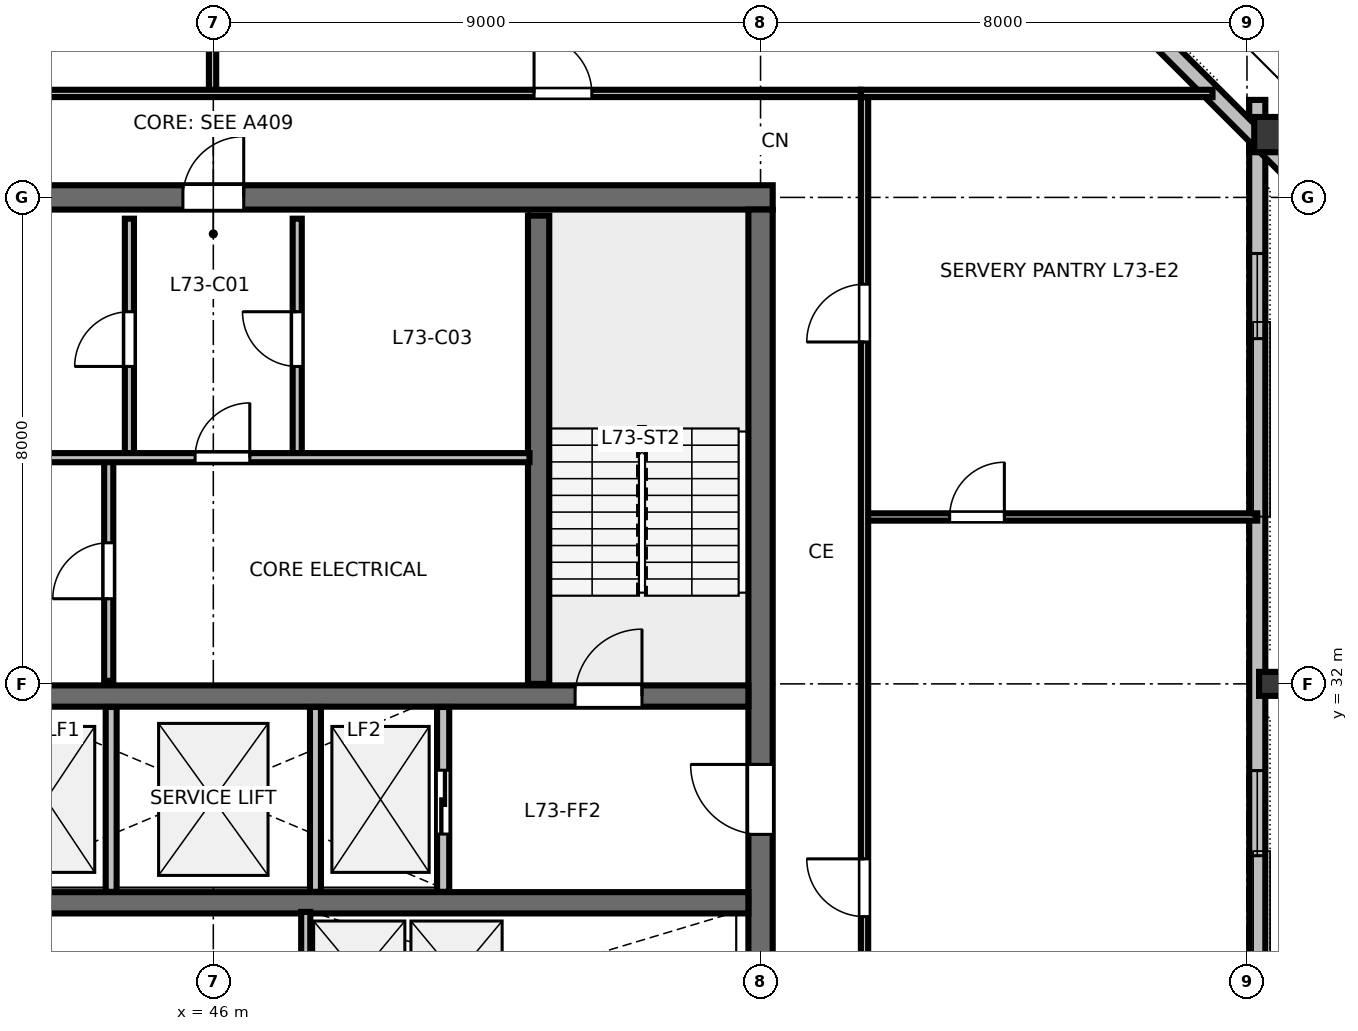
"""IFC4 building model, lengths in metres.
Left out: names, types, materials, properties, quantities, classifications, styles, units other than length and angle.
Written with IfcOpenShell. Run it as: python <this file> out.ifc"""

import sys

from ifc_helpers import new_model, si_unit, direction, frame, frame_2d, origin, origin_2d, place, context, subcontext, project, spatial, rectangle, hollow_rectangle, i_section, extrude, element, fill, save


model = new_model("IFC4")
c1 = context("Model", 3, precision=1e-05, world=origin(), true_north=direction((0.0, 1.0)))
c2 = subcontext(c1, "Body", "Model", "MODEL_VIEW")
j1 = project(units=[si_unit("LENGTHUNIT", "METRE"), si_unit("PLANEANGLEUNIT", "RADIAN")], contexts=[c1])
p1 = place(None, origin())
s1 = spatial("IfcSite", under=j1, at=p1, CompositionType="ELEMENT")
p2 = place(p1, origin())
s2 = spatial("IfcBuilding", under=s1, at=p2, CompositionType="ELEMENT")
p3 = place(p2, frame((0.0, 0.0, 275.4)))
s3 = spatial("IfcBuildingStorey", under=s2, at=p3, CompositionType="ELEMENT", Elevation=275.4)
p4 = place(p3, frame((36.8, 40.0, 0.0), z_axis=(0.0, 0.0, 1.0), x_axis=(1.0, 0.0, 0.0)))
e1 = element("IfcWall", 1, at=p4, inside=s3, PredefinedType="SHEAR", context=c2, shape_type="SweptSolid", body=[
    extrude(rectangle(XDim=18.4, YDim=0.4, at=frame_2d((9.2, 0.0))), origin(), (0.0, 0.0, 1.0), 3.28),
])
p5 = place(p4, frame((8.7, 0.0, 0.0)))
e2 = element("IfcOpeningElement", 2, at=p5, cuts=e1, PredefinedType="OPENING", context=c2, shape_type="SweptSolid", body=[
    extrude(rectangle(XDim=1.0, YDim=2.15, at=frame_2d((0.5, 1.075))), frame((0.0, 0.21, 0.0), z_axis=(0.0, -1.0, 0.0), x_axis=(1.0, 0.0, 0.0)), (0.0, 0.0, 1.0), 0.42),
])
p6 = place(p3, frame((55.0, 24.2, 0.0), z_axis=(0.0, 0.0, 1.0), x_axis=(0.0, 1.0, 0.0)))
e3 = element("IfcWall", 3, at=p6, inside=s3, PredefinedType="SHEAR", context=c2, shape_type="SweptSolid", body=[
    extrude(rectangle(XDim=15.6, YDim=0.4, at=frame_2d((7.8, 0.0))), origin(), (0.0, 0.0, 1.0), 3.28),
])
p7 = place(p6, frame((5.325, 0.0, 0.0)))
e4 = element("IfcOpeningElement", 4, at=p7, cuts=e3, PredefinedType="OPENING", context=c2, shape_type="SweptSolid", body=[
    extrude(rectangle(XDim=1.15, YDim=2.15, at=frame_2d((0.575, 1.075))), frame((0.0, 0.21, 0.0), z_axis=(0.0, -1.0, 0.0), x_axis=(1.0, 0.0, 0.0)), (0.0, 0.0, 1.0), 0.42),
])
p8 = place(p3, frame((37.2, 31.8, 0.0), z_axis=(0.0, 0.0, 1.0), x_axis=(1.0, 0.0, 0.0)))
e5 = element("IfcWall", 5, at=p8, inside=s3, PredefinedType="SHEAR", context=c2, shape_type="SweptSolid", body=[
    extrude(rectangle(XDim=17.6, YDim=0.35, at=frame_2d((8.8, 0.0))), origin(), (0.0, 0.0, 1.0), 3.28),
])
p9 = place(p8, frame((0.85, 0.0, 0.0)))
e6 = element("IfcOpeningElement", 6, at=p9, cuts=e5, PredefinedType="OPENING", context=c2, shape_type="SweptSolid", body=[
    extrude(rectangle(XDim=1.1, YDim=2.15, at=frame_2d((0.55, 1.075))), frame((0.0, 0.185, 0.0), z_axis=(0.0, -1.0, 0.0), x_axis=(1.0, 0.0, 0.0)), (0.0, 0.0, 1.0), 0.37),
])
p10 = place(p8, frame((14.75, 0.0, 0.0)))
e7 = element("IfcOpeningElement", 7, at=p10, cuts=e5, PredefinedType="OPENING", context=c2, shape_type="SweptSolid", body=[
    extrude(rectangle(XDim=1.1, YDim=2.15, at=frame_2d((0.55, 1.075))), frame((0.0, 0.185, 0.0), z_axis=(0.0, -1.0, 0.0), x_axis=(1.0, 0.0, 0.0)), (0.0, 0.0, 1.0), 0.37),
])
p11 = place(p3, frame((37.2, 28.4, 0.0), z_axis=(0.0, 0.0, 1.0), x_axis=(1.0, 0.0, 0.0)))
e8 = element("IfcWall", 8, at=p11, inside=s3, PredefinedType="SHEAR", context=c2, shape_type="SweptSolid", body=[
    extrude(rectangle(XDim=17.6, YDim=0.35, at=frame_2d((8.8, 0.0))), origin(), (0.0, 0.0, 1.0), 3.28),
])
p12 = place(p3, frame((63.389, 32.0, 0.0), z_axis=(-0.124611214962, 0.0, 0.99220564658), x_axis=(0.99220564658, 0.0, 0.124611214962)))
e9 = element("IfcColumn", 9, at=p12, inside=s3, PredefinedType="COLUMN", context=c2, shape_type="SweptSolid", body=[
    extrude(i_section(OverallWidth=0.395, OverallDepth=0.38, WebThickness=0.019, FlangeThickness=0.03, FilletRadius=0.025, at=origin_2d()), origin(), (0.0, 0.0, 1.0), 3.284),
])
p13 = place(p3, frame((63.469, 41.033, 0.0), z_axis=(-0.124526454344, -0.108785128068, 0.986234737818), x_axis=(0.742735851575, 0.648846987251, 0.165351268276)))
e10 = element("IfcColumn", 10, at=p13, inside=s3, PredefinedType="COLUMN", context=c2, shape_type="SweptSolid", body=[
    extrude(hollow_rectangle(XDim=0.58, YDim=0.7, WallThickness=0.032, at=origin_2d()), origin(), (0.0, 0.0, 1.0), 3.303),
])
p14 = place(p3, frame((63.169, 22.396, 0.0), z_axis=(0.0, 0.0, 1.0), x_axis=(0.0, 1.0, 0.0)))
e11 = element("IfcWall", 11, at=p14, inside=s3, PredefinedType="STANDARD", context=c2, shape_type="SweptSolid", body=[
    extrude(rectangle(XDim=19.207, YDim=0.265, at=frame_2d((9.604, 0.0))), origin(), (0.0, 0.0, 1.0), 2.717),
])
p15 = place(p14, frame((2.526, 0.0, 0.85)))
e12 = element("IfcOpeningElement", 12, at=p15, cuts=e11, PredefinedType="OPENING", context=c2, shape_type="SweptSolid", body=[
    extrude(rectangle(XDim=1.4, YDim=1.2, at=frame_2d((0.7, 0.6))), frame((0.0, 0.142, 0.0), z_axis=(0.0, -1.0, 0.0), x_axis=(1.0, 0.0, 0.0)), (0.0, 0.0, 1.0), 0.285),
])
p16 = place(p14, frame((6.778, 0.0, 0.85)))
e13 = element("IfcOpeningElement", 13, at=p16, cuts=e11, PredefinedType="OPENING", context=c2, shape_type="SweptSolid", body=[
    extrude(rectangle(XDim=1.4, YDim=1.2, at=frame_2d((0.7, 0.6))), frame((0.0, 0.142, 0.0), z_axis=(0.0, -1.0, 0.0), x_axis=(1.0, 0.0, 0.0)), (0.0, 0.0, 1.0), 0.285),
])
p17 = place(p14, frame((15.281, 0.0, 0.85)))
e14 = element("IfcOpeningElement", 14, at=p17, cuts=e11, PredefinedType="OPENING", context=c2, shape_type="SweptSolid", body=[
    extrude(rectangle(XDim=1.4, YDim=1.2, at=frame_2d((0.7, 0.6))), frame((0.0, 0.142, 0.0), z_axis=(0.0, -1.0, 0.0), x_axis=(1.0, 0.0, 0.0)), (0.0, 0.0, 1.0), 0.285),
])
p18 = place(p3, frame((63.614, 40.529, 0.0), z_axis=(0.0, 0.0, 1.0), x_axis=(-0.707106781187, 0.707106781187, 0.0)))
e15 = element("IfcWall", 15, at=p18, inside=s3, PredefinedType="STANDARD", context=c2, shape_type="SweptSolid", body=[
    extrude(rectangle(XDim=11.125, YDim=0.265, at=frame_2d((5.562, 0.0))), origin(), (0.0, 0.0, 1.0), 2.717),
])
p19 = place(p3, frame((51.35, 32.0, 0.0), z_axis=(0.0, 0.0, 1.0), x_axis=(0.0, 1.0, 0.0)))
e16 = element("IfcWall", 16, at=p19, inside=s3, PredefinedType="SHEAR", context=c2, shape_type="SweptSolid", body=[
    extrude(rectangle(XDim=7.7, YDim=0.35, at=frame_2d((3.85, 0.0))), origin(), (0.0, 0.0, 1.0), 3.6),
])
p20 = place(p3, frame((44.62, 35.72, 0.0), z_axis=(0.0, 0.0, 1.0), x_axis=(0.0, 1.0, 0.0)))
e17 = element("IfcWall", 17, at=p20, inside=s3, PredefinedType="PARTITIONING", context=c2, shape_type="SweptSolid", body=[
    extrude(rectangle(XDim=3.93, YDim=0.15, at=frame_2d((1.965, 0.0))), origin(), (0.0, 0.0, 1.0), 3.26),
])
p21 = place(p20, frame((1.5, 0.0, 0.0)))
e18 = element("IfcOpeningElement", 18, at=p21, cuts=e17, PredefinedType="OPENING", context=c2, shape_type="SweptSolid", body=[
    extrude(rectangle(XDim=0.9, YDim=2.15, at=frame_2d((0.45, 1.075))), frame((0.0, 0.085, 0.0), z_axis=(0.0, -1.0, 0.0), x_axis=(1.0, 0.0, 0.0)), (0.0, 0.0, 1.0), 0.17),
])
p22 = place(p3, frame((47.38, 35.72, 0.0), z_axis=(0.0, 0.0, 1.0), x_axis=(0.0, 1.0, 0.0)))
e19 = element("IfcWall", 19, at=p22, inside=s3, PredefinedType="PARTITIONING", context=c2, shape_type="SweptSolid", body=[
    extrude(rectangle(XDim=3.93, YDim=0.15, at=frame_2d((1.965, 0.0))), origin(), (0.0, 0.0, 1.0), 3.26),
])
p23 = place(p22, frame((1.5, 0.0, 0.0)))
e20 = element("IfcOpeningElement", 20, at=p23, cuts=e19, PredefinedType="OPENING", context=c2, shape_type="SweptSolid", body=[
    extrude(rectangle(XDim=0.9, YDim=2.15, at=frame_2d((0.45, 1.075))), frame((0.0, 0.085, 0.0), z_axis=(0.0, -1.0, 0.0), x_axis=(1.0, 0.0, 0.0)), (0.0, 0.0, 1.0), 0.17),
])
p24 = place(p3, frame((44.28, 32.05, 0.0), z_axis=(0.0, 0.0, 1.0), x_axis=(0.0, 1.0, 0.0)))
e21 = element("IfcWall", 21, at=p24, inside=s3, PredefinedType="PARTITIONING", context=c2, shape_type="SweptSolid", body=[
    extrude(rectangle(XDim=3.67, YDim=0.15, at=frame_2d((1.835, 0.0))), origin(), (0.0, 0.0, 1.0), 3.26),
])
p25 = place(p24, frame((1.35, 0.0, 0.0)))
e22 = element("IfcOpeningElement", 22, at=p25, cuts=e21, PredefinedType="OPENING", context=c2, shape_type="SweptSolid", body=[
    extrude(rectangle(XDim=0.92, YDim=2.15, at=frame_2d((0.46, 1.075))), frame((0.0, 0.085, 0.0), z_axis=(0.0, -1.0, 0.0), x_axis=(1.0, 0.0, 0.0)), (0.0, 0.0, 1.0), 0.17),
])
p26 = place(p3, frame((40.8, 35.72, 0.0), z_axis=(0.0, 0.0, 1.0), x_axis=(1.0, 0.0, 0.0)))
e23 = element("IfcWall", 23, at=p26, inside=s3, PredefinedType="PARTITIONING", context=c2, shape_type="SweptSolid", body=[
    extrude(rectangle(XDim=10.4, YDim=0.15, at=frame_2d((5.2, 0.0))), origin(), (0.0, 0.0, 1.0), 3.26),
])
p27 = place(p26, frame((4.9, 0.0, 0.0)))
e24 = element("IfcOpeningElement", 24, at=p27, cuts=e23, PredefinedType="OPENING", context=c2, shape_type="SweptSolid", body=[
    extrude(rectangle(XDim=0.9, YDim=2.15, at=frame_2d((0.45, 1.075))), frame((0.0, 0.085, 0.0), z_axis=(0.0, -1.0, 0.0), x_axis=(1.0, 0.0, 0.0)), (0.0, 0.0, 1.0), 0.17),
])
p28 = place(p3, frame((49.78, 28.58, 0.0), z_axis=(0.0, 0.0, 1.0), x_axis=(0.0, 1.0, 0.0)))
e25 = element("IfcWall", 25, at=p28, inside=s3, PredefinedType="PARTITIONING", context=c2, shape_type="SweptSolid", body=[
    extrude(rectangle(XDim=3.04, YDim=0.2, at=frame_2d((1.52, 0.0))), origin(), (0.0, 0.0, 1.0), 3.26),
])
p29 = place(p28, frame((0.95, 0.0, 0.0)))
e26 = element("IfcOpeningElement", 26, at=p29, cuts=e25, PredefinedType="OPENING", context=c2, shape_type="SweptSolid", body=[
    extrude(rectangle(XDim=1.05, YDim=2.15, at=frame_2d((0.525, 1.075))), frame((0.0, 0.11, 0.0), z_axis=(0.0, -1.0, 0.0), x_axis=(1.0, 0.0, 0.0)), (0.0, 0.0, 1.0), 0.22),
])
for number, where, z_axis, x_axis in (
    (27, (44.32, 28.58, 0.0), (0.0, 0.0, 1.0), (0.0, 1.0, 0.0)),
    (28, (47.68, 28.58, 0.0), (0.0, 0.0, 1.0), (0.0, 1.0, 0.0)),
):
    element("IfcWall", number, at=place(p3, frame(where, z_axis=z_axis, x_axis=x_axis)), inside=s3, PredefinedType="PARTITIONING", context=c2, shape_type="SweptSolid", body=[
        extrude(rectangle(XDim=3.04, YDim=0.18, at=frame_2d((1.52, 0.0))), origin(), (0.0, 0.0, 1.0), 3.26),
    ])
p30 = place(p3, frame((47.52, 24.35, 0.0), z_axis=(0.0, 0.0, 1.0), x_axis=(0.0, 1.0, 0.0)))
e29 = element("IfcWall", 29, at=p30, inside=s3, PredefinedType="PARTITIONING", context=c2, shape_type="SweptSolid", body=[
    extrude(rectangle(XDim=3.9, YDim=0.15, at=frame_2d((1.95, 0.0))), origin(), (0.0, 0.0, 1.0), 3.26),
])
p31 = place(p30, frame((0.35, 0.0, 0.0)))
e30 = element("IfcOpeningElement", 30, at=p31, cuts=e29, PredefinedType="OPENING", context=c2, shape_type="SweptSolid", body=[
    extrude(rectangle(XDim=0.9, YDim=2.15, at=frame_2d((0.45, 1.075))), frame((0.0, 0.085, 0.0), z_axis=(0.0, -1.0, 0.0), x_axis=(1.0, 0.0, 0.0)), (0.0, 0.0, 1.0), 0.17),
])
p32 = place(p3, frame((45.987, 41.71, 0.0), z_axis=(0.0, 0.0, 1.0), x_axis=(0.0, 1.0, 0.0)))
e31 = element("IfcWall", 31, at=p32, inside=s3, PredefinedType="PARTITIONING", context=c2, shape_type="SweptSolid", body=[
    extrude(rectangle(XDim=6.241, YDim=0.12, at=frame_2d((3.121, 0.0))), origin(), (0.0, 0.0, 1.0), 2.54),
])
p33 = place(p32, frame((1.4, 0.0, 0.0)))
e32 = element("IfcOpeningElement", 32, at=p33, cuts=e31, PredefinedType="OPENING", context=c2, shape_type="SweptSolid", body=[
    extrude(rectangle(XDim=0.9, YDim=2.15, at=frame_2d((0.45, 1.075))), frame((0.0, 0.07, 0.0), z_axis=(0.0, -1.0, 0.0), x_axis=(1.0, 0.0, 0.0)), (0.0, 0.0, 1.0), 0.14),
])
p34 = place(p3, frame((35.35, 41.71, 0.0), z_axis=(0.0, 0.0, 1.0), x_axis=(1.0, 0.0, 0.0)))
e33 = element("IfcWall", 33, at=p34, inside=s3, PredefinedType="PARTITIONING", context=c2, shape_type="SweptSolid", body=[
    extrude(rectangle(XDim=21.3, YDim=0.12, at=frame_2d((10.65, 0.0))), origin(), (0.0, 0.0, 1.0), 2.54),
])
p35 = place(p34, frame((4.425, 0.0, 0.0)))
e34 = element("IfcOpeningElement", 34, at=p35, cuts=e33, PredefinedType="OPENING", context=c2, shape_type="SweptSolid", body=[
    extrude(rectangle(XDim=0.95, YDim=2.15, at=frame_2d((0.475, 1.075))), frame((0.0, 0.07, 0.0), z_axis=(0.0, -1.0, 0.0), x_axis=(1.0, 0.0, 0.0)), (0.0, 0.0, 1.0), 0.14),
])
p36 = place(p34, frame((15.925, 0.0, 0.0)))
e35 = element("IfcOpeningElement", 35, at=p36, cuts=e33, PredefinedType="OPENING", context=c2, shape_type="SweptSolid", body=[
    extrude(rectangle(XDim=0.95, YDim=2.15, at=frame_2d((0.475, 1.075))), frame((0.0, 0.07, 0.0), z_axis=(0.0, -1.0, 0.0), x_axis=(1.0, 0.0, 0.0)), (0.0, 0.0, 1.0), 0.14),
])
p37 = place(p3, frame((56.71, 34.745, 0.0), z_axis=(0.0, 0.0, 1.0), x_axis=(1.0, 0.0, 0.0)))
e36 = element("IfcWall", 36, at=p37, inside=s3, PredefinedType="PARTITIONING", context=c2, shape_type="SweptSolid", body=[
    extrude(rectangle(XDim=6.459, YDim=0.12, at=frame_2d((3.229, 0.0))), origin(), (0.0, 0.0, 1.0), 2.54),
])
p38 = place(p37, frame((1.4, 0.0, 0.0)))
e37 = element("IfcOpeningElement", 37, at=p38, cuts=e36, PredefinedType="OPENING", context=c2, shape_type="SweptSolid", body=[
    extrude(rectangle(XDim=0.9, YDim=2.15, at=frame_2d((0.45, 1.075))), frame((0.0, 0.07, 0.0), z_axis=(0.0, -1.0, 0.0), x_axis=(1.0, 0.0, 0.0)), (0.0, 0.0, 1.0), 0.14),
])
p39 = place(p3, frame((56.71, 22.35, 0.0), z_axis=(0.0, 0.0, 1.0), x_axis=(0.0, 1.0, 0.0)))
e38 = element("IfcWall", 38, at=p39, inside=s3, PredefinedType="PARTITIONING", context=c2, shape_type="SweptSolid", body=[
    extrude(rectangle(XDim=19.3, YDim=0.12, at=frame_2d((9.65, 0.0))), origin(), (0.0, 0.0, 1.0), 2.54),
])
p40 = place(p39, frame((5.823, 0.0, 0.0)))
e39 = element("IfcOpeningElement", 39, at=p40, cuts=e38, PredefinedType="OPENING", context=c2, shape_type="SweptSolid", body=[
    extrude(rectangle(XDim=0.95, YDim=2.15, at=frame_2d((0.475, 1.075))), frame((0.0, 0.07, 0.0), z_axis=(0.0, -1.0, 0.0), x_axis=(1.0, 0.0, 0.0)), (0.0, 0.0, 1.0), 0.14),
])
p41 = place(p39, frame((15.272, 0.0, 0.0)))
e40 = element("IfcOpeningElement", 40, at=p41, cuts=e38, PredefinedType="OPENING", context=c2, shape_type="SweptSolid", body=[
    extrude(rectangle(XDim=0.95, YDim=2.15, at=frame_2d((0.475, 1.075))), frame((0.0, 0.07, 0.0), z_axis=(0.0, -1.0, 0.0), x_axis=(1.0, 0.0, 0.0)), (0.0, 0.0, 1.0), 0.14),
])
p42 = place(p3, frame((56.65, 41.71, 0.0), z_axis=(0.0, 0.0, 1.0), x_axis=(1.0, 0.0, 0.0)))
e41 = element("IfcWall", 41, at=p42, inside=s3, PredefinedType="PARTITIONING", context=c2, shape_type="SweptSolid", body=[
    extrude(rectangle(XDim=5.783, YDim=0.12, at=frame_2d((2.892, 0.0))), origin(), (0.0, 0.0, 1.0), 2.54),
])
p43 = place(p16, origin())
e42 = element("IfcWindow", 42, at=p43, inside=s3, PartitioningType="SINGLE_PANEL", PredefinedType="WINDOW", context=c2, shape_type="SweptSolid", body=[
    extrude(rectangle(XDim=1.4, YDim=1.2, at=frame_2d((0.7, 0.6))), frame((0.0, 0.03, 0.0), z_axis=(0.0, -1.0, 0.0), x_axis=(1.0, 0.0, 0.0)), (0.0, 0.0, 1.0), 0.06),
])
fill(e13, e42)
p44 = place(p17, origin())
e43 = element("IfcWindow", 43, at=p44, inside=s3, PartitioningType="SINGLE_PANEL", PredefinedType="WINDOW", context=c2, shape_type="SweptSolid", body=[
    extrude(rectangle(XDim=1.4, YDim=1.2, at=frame_2d((0.7, 0.6))), frame((0.0, 0.03, 0.0), z_axis=(0.0, -1.0, 0.0), x_axis=(1.0, 0.0, 0.0)), (0.0, 0.0, 1.0), 0.06),
])
fill(e14, e43)
p45 = place(p10, origin())
e44 = element("IfcDoor", 44, at=p45, inside=s3, OperationType="SINGLE_SWING_RIGHT", PredefinedType="DOOR", context=c2, shape_type="SweptSolid", body=[
    extrude(rectangle(XDim=1.1, YDim=2.15, at=frame_2d((0.55, 1.075))), frame((0.0, 0.025, 0.0), z_axis=(0.0, -1.0, 0.0), x_axis=(1.0, 0.0, 0.0)), (0.0, 0.0, 1.0), 0.05),
])
fill(e7, e44)
p46 = place(p5, origin())
e45 = element("IfcDoor", 45, at=p46, inside=s3, OperationType="SINGLE_SWING_RIGHT", PredefinedType="DOOR", context=c2, shape_type="SweptSolid", body=[
    extrude(rectangle(XDim=1.0, YDim=2.15, at=frame_2d((0.5, 1.075))), frame((0.0, 0.025, 0.0), z_axis=(0.0, -1.0, 0.0), x_axis=(1.0, 0.0, 0.0)), (0.0, 0.0, 1.0), 0.05),
])
fill(e2, e45)
p47 = place(p7, origin())
e46 = element("IfcDoor", 46, at=p47, inside=s3, OperationType="SINGLE_SWING_RIGHT", PredefinedType="DOOR", context=c2, shape_type="SweptSolid", body=[
    extrude(rectangle(XDim=1.15, YDim=2.15, at=frame_2d((0.575, 1.075))), frame((0.0, 0.025, 0.0), z_axis=(0.0, -1.0, 0.0), x_axis=(1.0, 0.0, 0.0)), (0.0, 0.0, 1.0), 0.05),
])
fill(e4, e46)
p48 = place(p21, origin())
e47 = element("IfcDoor", 47, at=p48, inside=s3, OperationType="SINGLE_SWING_LEFT", PredefinedType="DOOR", context=c2, shape_type="SweptSolid", body=[
    extrude(rectangle(XDim=0.9, YDim=2.15, at=frame_2d((0.45, 1.075))), frame((0.0, 0.025, 0.0), z_axis=(0.0, -1.0, 0.0), x_axis=(1.0, 0.0, 0.0)), (0.0, 0.0, 1.0), 0.05),
])
fill(e18, e47)
p49 = place(p23, origin())
e48 = element("IfcDoor", 48, at=p49, inside=s3, OperationType="SINGLE_SWING_RIGHT", PredefinedType="DOOR", context=c2, shape_type="SweptSolid", body=[
    extrude(rectangle(XDim=0.9, YDim=2.15, at=frame_2d((0.45, 1.075))), frame((0.0, 0.025, 0.0), z_axis=(0.0, -1.0, 0.0), x_axis=(1.0, 0.0, 0.0)), (0.0, 0.0, 1.0), 0.05),
])
fill(e20, e48)
p50 = place(p25, origin())
e49 = element("IfcDoor", 49, at=p50, inside=s3, OperationType="SINGLE_SWING_LEFT", PredefinedType="DOOR", context=c2, shape_type="SweptSolid", body=[
    extrude(rectangle(XDim=0.92, YDim=2.15, at=frame_2d((0.46, 1.075))), frame((0.0, 0.025, 0.0), z_axis=(0.0, -1.0, 0.0), x_axis=(1.0, 0.0, 0.0)), (0.0, 0.0, 1.0), 0.05),
])
fill(e22, e49)
p51 = place(p27, origin())
e50 = element("IfcDoor", 50, at=p51, inside=s3, OperationType="SINGLE_SWING_RIGHT", PredefinedType="DOOR", context=c2, shape_type="SweptSolid", body=[
    extrude(rectangle(XDim=0.9, YDim=2.15, at=frame_2d((0.45, 1.075))), frame((0.0, 0.025, 0.0), z_axis=(0.0, -1.0, 0.0), x_axis=(1.0, 0.0, 0.0)), (0.0, 0.0, 1.0), 0.05),
])
fill(e24, e50)
p52 = place(p29, origin())
e51 = element("IfcDoor", 51, at=p52, inside=s3, OperationType="SLIDING_TO_RIGHT", PredefinedType="DOOR", context=c2, shape_type="SweptSolid", body=[
    extrude(rectangle(XDim=1.05, YDim=2.15, at=frame_2d((0.525, 1.075))), frame((0.0, 0.025, 0.0), z_axis=(0.0, -1.0, 0.0), x_axis=(1.0, 0.0, 0.0)), (0.0, 0.0, 1.0), 0.05),
])
fill(e26, e51)
p53 = place(p36, origin())
e52 = element("IfcDoor", 52, at=p53, inside=s3, OperationType="SINGLE_SWING_LEFT", PredefinedType="DOOR", context=c2, shape_type="SweptSolid", body=[
    extrude(rectangle(XDim=0.95, YDim=2.15, at=frame_2d((0.475, 1.075))), frame((0.0, 0.025, 0.0), z_axis=(0.0, -1.0, 0.0), x_axis=(1.0, 0.0, 0.0)), (0.0, 0.0, 1.0), 0.05),
])
fill(e35, e52)
p54 = place(p38, origin())
e53 = element("IfcDoor", 53, at=p54, inside=s3, OperationType="SINGLE_SWING_RIGHT", PredefinedType="DOOR", context=c2, shape_type="SweptSolid", body=[
    extrude(rectangle(XDim=0.9, YDim=2.15, at=frame_2d((0.45, 1.075))), frame((0.0, 0.025, 0.0), z_axis=(0.0, -1.0, 0.0), x_axis=(1.0, 0.0, 0.0)), (0.0, 0.0, 1.0), 0.05),
])
fill(e37, e53)
p55 = place(p40, origin())
e54 = element("IfcDoor", 54, at=p55, inside=s3, OperationType="SINGLE_SWING_RIGHT", PredefinedType="DOOR", context=c2, shape_type="SweptSolid", body=[
    extrude(rectangle(XDim=0.95, YDim=2.15, at=frame_2d((0.475, 1.075))), frame((0.0, 0.025, 0.0), z_axis=(0.0, -1.0, 0.0), x_axis=(1.0, 0.0, 0.0)), (0.0, 0.0, 1.0), 0.05),
])
fill(e39, e54)
p56 = place(p41, origin())
e55 = element("IfcDoor", 55, at=p56, inside=s3, OperationType="SINGLE_SWING_LEFT", PredefinedType="DOOR", context=c2, shape_type="SweptSolid", body=[
    extrude(rectangle(XDim=0.95, YDim=2.15, at=frame_2d((0.475, 1.075))), frame((0.0, 0.025, 0.0), z_axis=(0.0, -1.0, 0.0), x_axis=(1.0, 0.0, 0.0)), (0.0, 0.0, 1.0), 0.05),
])
fill(e40, e55)
save(model, sys.argv[1])
